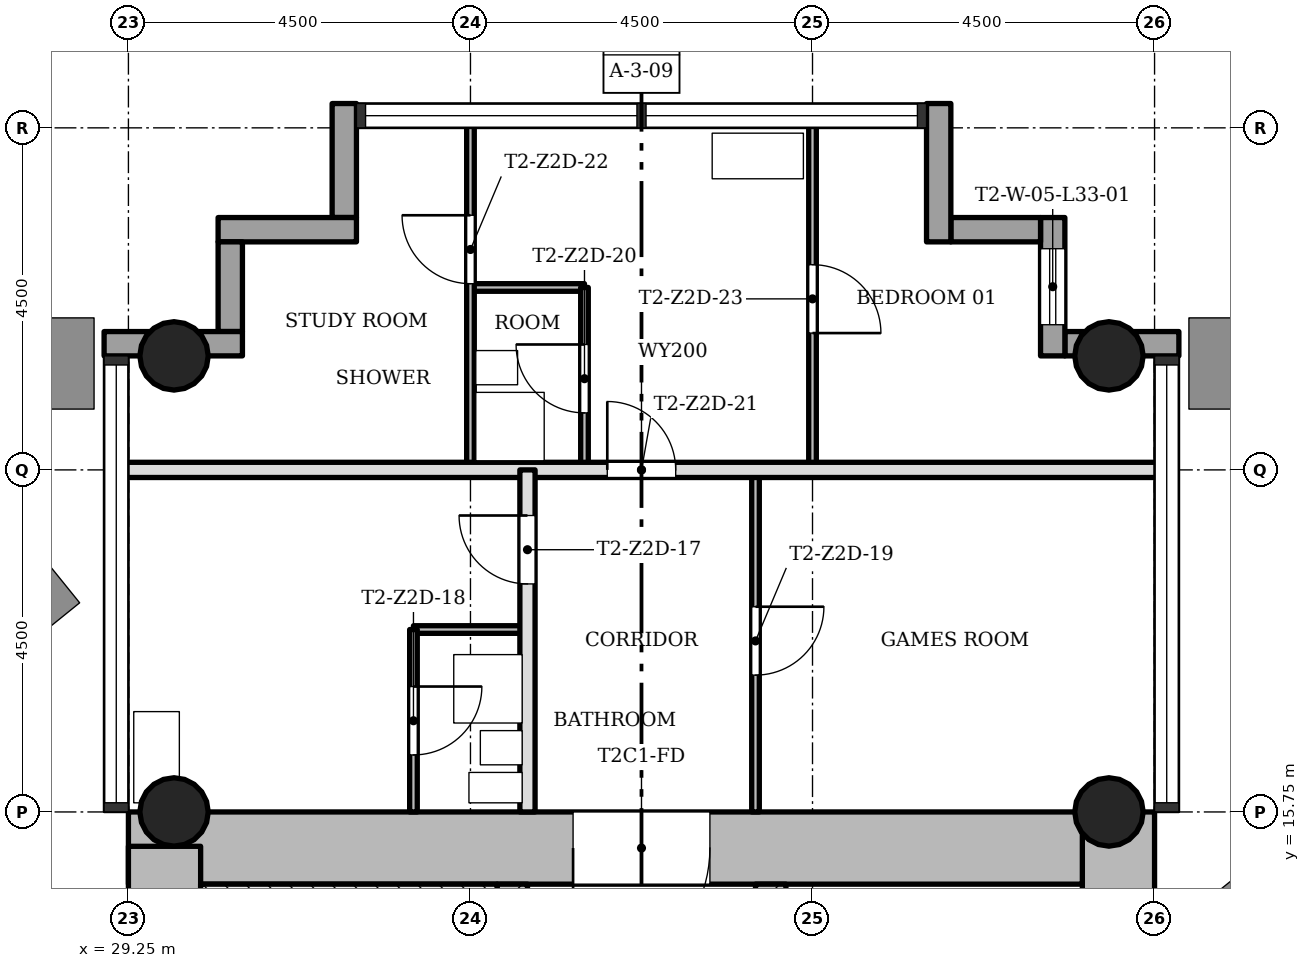
"""IFC4 building model, lengths in metres.
Left out: names, types, materials, properties, quantities, classifications, styles, units other than length and angle.
Written with IfcOpenShell. Run it as: python <this file> out.ifc"""

import sys

from ifc_helpers import new_model, si_unit, direction, frame, frame_2d, origin, origin_2d, place, context, subcontext, project, spatial, rectangle, hollow_circle, extrude, element, fill, save


model = new_model("IFC4")
c1 = context("Model", 3, precision=1e-05, world=origin(), true_north=direction((0.0, 1.0)))
c2 = subcontext(c1, "Body", "Model", "MODEL_VIEW")
j1 = project(units=[si_unit("LENGTHUNIT", "METRE"), si_unit("PLANEANGLEUNIT", "RADIAN")], contexts=[c1])
p1 = place(None, origin())
s1 = spatial("IfcSite", under=j1, at=p1, CompositionType="ELEMENT")
p2 = place(p1, origin())
s2 = spatial("IfcBuilding", under=s1, at=p2, CompositionType="ELEMENT")
p3 = place(p2, frame((0.0, 0.0, 120.8)))
s3 = spatial("IfcBuildingStorey", under=s2, at=p3, CompositionType="ELEMENT", Elevation=120.8)
p4 = place(p3, frame((42.275, 7.7, 0.0), z_axis=(0.0, 0.0, 1.0), x_axis=(0.0, 1.0, 0.0)))
e1 = element("IfcWall", 1, at=p4, inside=s3, PredefinedType="SHEAR", context=c2, shape_type="SweptSolid", body=[
    extrude(rectangle(XDim=8.05, YDim=0.95, at=frame_2d((4.025, 0.0))), origin(), (0.0, 0.0, 1.0), 3.4),
])
p5 = place(p3, frame((41.8, 15.275, 0.0), z_axis=(0.0, 0.0, 1.0), x_axis=(-1.0, 0.0, 0.0)))
e2 = element("IfcWall", 2, at=p5, inside=s3, PredefinedType="SHEAR", context=c2, shape_type="SweptSolid", body=[
    extrude(rectangle(XDim=12.55, YDim=0.95, at=frame_2d((6.275, 0.0))), origin(), (0.0, 0.0, 1.0), 3.4),
])
p6 = place(p5, frame((4.9, 0.0, 0.0)))
e3 = element("IfcOpeningElement", 3, at=p6, cuts=e2, PredefinedType="OPENING", context=c2, shape_type="SweptSolid", body=[
    extrude(rectangle(XDim=1.8, YDim=2.1, at=frame_2d((0.9, 1.05))), frame((0.0, 0.485, 0.0), z_axis=(0.0, -1.0, 0.0), x_axis=(1.0, 0.0, 0.0)), (0.0, 0.0, 1.0), 0.97),
])
p7 = place(p3, frame((29.725, 15.298, 0.0), z_axis=(0.0, 0.0, 1.0), x_axis=(0.0, -1.0, 0.0)))
e4 = element("IfcWall", 4, at=p7, inside=s3, PredefinedType="SHEAR", context=c2, shape_type="SweptSolid", body=[
    extrude(rectangle(XDim=8.696, YDim=0.95, at=frame_2d((4.348, 0.0))), origin(), (0.0, 0.0, 1.0), 3.4),
])
p8 = place(p3, frame((34.3, 7.7, 0.0), z_axis=(0.0, 0.0, 1.0), x_axis=(0.0, 1.0, 0.0)))
e5 = element("IfcWall", 5, at=p8, inside=s3, PredefinedType="SHEAR", context=c2, shape_type="SweptSolid", body=[
    extrude(rectangle(XDim=7.1, YDim=0.4, at=frame_2d((3.55, 0.0))), origin(), (0.0, 0.0, 1.0), 3.4),
])
p9 = place(p8, frame((0.7, 0.0, 0.0)))
e6 = element("IfcOpeningElement", 6, at=p9, cuts=e5, PredefinedType="OPENING", context=c2, shape_type="SweptSolid", body=[
    extrude(rectangle(XDim=0.9, YDim=2.1, at=frame_2d((0.45, 1.05))), frame((0.0, 0.21, 0.0), z_axis=(0.0, -1.0, 0.0), x_axis=(1.0, 0.0, 0.0)), (0.0, 0.0, 1.0), 0.42),
])
p10 = place(p3, frame((37.7, 7.7, 0.0), z_axis=(0.0, 0.0, 1.0), x_axis=(0.0, 1.0, 0.0)))
e7 = element("IfcWall", 7, at=p10, inside=s3, PredefinedType="SHEAR", context=c2, shape_type="SweptSolid", body=[
    extrude(rectangle(XDim=7.1, YDim=0.4, at=frame_2d((3.55, 0.0))), origin(), (0.0, 0.0, 1.0), 3.4),
])
p11 = place(p10, frame((0.8, 0.0, 0.0)))
e8 = element("IfcOpeningElement", 8, at=p11, cuts=e7, PredefinedType="OPENING", context=c2, shape_type="SweptSolid", body=[
    extrude(rectangle(XDim=1.1, YDim=2.1, at=frame_2d((0.55, 1.05))), frame((0.0, 0.21, 0.0), z_axis=(0.0, -1.0, 0.0), x_axis=(1.0, 0.0, 0.0)), (0.0, 0.0, 1.0), 0.42),
])
p12 = place(p10, frame((3.0, 0.0, 0.0)))
e9 = element("IfcOpeningElement", 9, at=p12, cuts=e7, PredefinedType="OPENING", context=c2, shape_type="SweptSolid", body=[
    extrude(rectangle(XDim=1.1, YDim=2.1, at=frame_2d((0.55, 1.05))), frame((0.0, 0.21, 0.0), z_axis=(0.0, -1.0, 0.0), x_axis=(1.0, 0.0, 0.0)), (0.0, 0.0, 1.0), 0.42),
])
p13 = place(p10, frame((5.2, 0.0, 0.0)))
e10 = element("IfcOpeningElement", 10, at=p13, cuts=e7, PredefinedType="OPENING", context=c2, shape_type="SweptSolid", body=[
    extrude(rectangle(XDim=1.1, YDim=2.1, at=frame_2d((0.55, 1.05))), frame((0.0, 0.21, 0.0), z_axis=(0.0, -1.0, 0.0), x_axis=(1.0, 0.0, 0.0)), (0.0, 0.0, 1.0), 0.42),
])
for number, where, z_axis, x_axis in (
    (11, (42.15, 15.75, 0.0), (0.0, 0.0, 1.0), (1.0, 0.0, 0.0)),
    (12, (29.85, 15.75, 0.0), (0.0, 0.0, 1.0), (1.0, 0.0, 0.0)),
    (13, (42.15, 21.75, 0.0), (0.0, 0.0, 1.0), (1.0, 0.0, 0.0)),
    (14, (29.85, 21.75, 0.0), (0.0, 0.0, 1.0), (1.0, 0.0, 0.0)),
):
    element("IfcColumn", number, at=place(p3, frame(where, z_axis=z_axis, x_axis=x_axis)), inside=s3, PredefinedType="COLUMN", context=c2, shape_type="SweptSolid", body=[
        extrude(hollow_circle(Radius=0.45, WallThickness=0.032, at=origin_2d()), origin(), (0.0, 0.0, 1.0), 3.4),
    ])
p14 = place(p3, frame((43.07, 21.91, -0.3), z_axis=(0.0, 0.0, 1.0), x_axis=(-1.0, 0.0, 0.0)))
e15 = element("IfcWall", 15, at=p14, inside=s3, PredefinedType="STANDARD", context=c2, shape_type="SweptSolid", body=[
    extrude(rectangle(XDim=1.5, YDim=0.32, at=frame_2d((0.75, 0.0))), origin(), (0.0, 0.0, 1.0), 3.4),
])
p15 = place(p3, frame((41.41, 21.75, -0.3), z_axis=(0.0, 0.0, 1.0), x_axis=(0.0, 1.0, 0.0)))
e16 = element("IfcWall", 16, at=p15, inside=s3, PredefinedType="STANDARD", context=c2, shape_type="SweptSolid", body=[
    extrude(rectangle(XDim=1.82, YDim=0.32, at=frame_2d((0.91, 0.0))), origin(), (0.0, 0.0, 1.0), 3.4),
])
p16 = place(p15, frame((0.41, 0.0, 1.2)))
e17 = element("IfcOpeningElement", 17, at=p16, cuts=e16, PredefinedType="OPENING", context=c2, shape_type="SweptSolid", body=[
    extrude(rectangle(XDim=1.0, YDim=1.5, at=frame_2d((0.5, 0.75))), frame((0.0, 0.17, 0.0), z_axis=(0.0, -1.0, 0.0), x_axis=(1.0, 0.0, 0.0)), (0.0, 0.0, 1.0), 0.34),
])
p17 = place(p3, frame((41.25, 23.41, -0.3), z_axis=(0.0, 0.0, 1.0), x_axis=(-1.0, 0.0, 0.0)))
e18 = element("IfcWall", 18, at=p17, inside=s3, PredefinedType="STANDARD", context=c2, shape_type="SweptSolid", body=[
    extrude(rectangle(XDim=1.18, YDim=0.32, at=frame_2d((0.59, 0.0))), origin(), (0.0, 0.0, 1.0), 3.4),
])
p18 = place(p3, frame((39.91, 23.25, -0.3), z_axis=(0.0, 0.0, 1.0), x_axis=(0.0, 1.0, 0.0)))
e19 = element("IfcWall", 19, at=p18, inside=s3, PredefinedType="STANDARD", context=c2, shape_type="SweptSolid", body=[
    extrude(rectangle(XDim=1.82, YDim=0.32, at=frame_2d((0.91, 0.0))), origin(), (0.0, 0.0, 1.0), 3.4),
])
p19 = place(p3, frame((32.09, 25.07, -0.3), z_axis=(0.0, 0.0, 1.0), x_axis=(0.0, -1.0, 0.0)))
e20 = element("IfcWall", 20, at=p19, inside=s3, PredefinedType="STANDARD", context=c2, shape_type="SweptSolid", body=[
    extrude(rectangle(XDim=1.5, YDim=0.32, at=frame_2d((0.75, 0.0))), origin(), (0.0, 0.0, 1.0), 3.4),
])
p20 = place(p3, frame((32.25, 23.41, -0.3), z_axis=(0.0, 0.0, 1.0), x_axis=(-1.0, 0.0, 0.0)))
e21 = element("IfcWall", 21, at=p20, inside=s3, PredefinedType="STANDARD", context=c2, shape_type="SweptSolid", body=[
    extrude(rectangle(XDim=1.82, YDim=0.32, at=frame_2d((0.91, 0.0))), origin(), (0.0, 0.0, 1.0), 3.4),
])
p21 = place(p3, frame((30.59, 23.25, -0.3), z_axis=(0.0, 0.0, 1.0), x_axis=(0.0, -1.0, 0.0)))
e22 = element("IfcWall", 22, at=p21, inside=s3, PredefinedType="STANDARD", context=c2, shape_type="SweptSolid", body=[
    extrude(rectangle(XDim=1.18, YDim=0.32, at=frame_2d((0.59, 0.0))), origin(), (0.0, 0.0, 1.0), 3.4),
])
p22 = place(p3, frame((30.75, 21.91, -0.3), z_axis=(0.0, 0.0, 1.0), x_axis=(-1.0, 0.0, 0.0)))
e23 = element("IfcWall", 23, at=p22, inside=s3, PredefinedType="STANDARD", context=c2, shape_type="SweptSolid", body=[
    extrude(rectangle(XDim=1.82, YDim=0.32, at=frame_2d((0.91, 0.0))), origin(), (0.0, 0.0, 1.0), 3.4),
])
p23 = place(p3, frame((34.5, 18.15, 0.0), z_axis=(0.0, 0.0, 1.0), x_axis=(-1.0, 0.0, 0.0)))
e24 = element("IfcWall", 24, at=p23, inside=s3, PredefinedType="PARTITIONING", context=c2, shape_type="SweptSolid", body=[
    extrude(rectangle(XDim=1.5, YDim=0.1, at=frame_2d((0.75, 0.0))), origin(), (0.0, 0.0, 1.0), 3.0),
])
p24 = place(p3, frame((42.85, 20.25, 0.0), z_axis=(0.0, 0.0, 1.0), x_axis=(-1.0, 0.0, 0.0)))
e25 = element("IfcWall", 25, at=p24, inside=s3, PredefinedType="SOLIDWALL", context=c2, shape_type="SweptSolid", body=[
    extrude(rectangle(XDim=13.7, YDim=0.2, at=frame_2d((6.85, 0.0))), origin(), (0.0, 0.0, 1.0), 3.0),
])
p25 = place(p24, frame((6.4, 0.0, 0.0)))
e26 = element("IfcOpeningElement", 26, at=p25, cuts=e25, PredefinedType="OPENING", context=c2, shape_type="SweptSolid", body=[
    extrude(rectangle(XDim=0.9, YDim=2.1, at=frame_2d((0.45, 1.05))), frame((0.0, 0.11, 0.0), z_axis=(0.0, -1.0, 0.0), x_axis=(1.0, 0.0, 0.0)), (0.0, 0.0, 1.0), 0.22),
])
p26 = place(p3, frame((35.25, 22.65, 0.0), z_axis=(0.0, 0.0, 1.0), x_axis=(-1.0, 0.0, 0.0)))
e27 = element("IfcWall", 27, at=p26, inside=s3, PredefinedType="PARTITIONING", context=c2, shape_type="SweptSolid", body=[
    extrude(rectangle(XDim=1.5, YDim=0.1, at=frame_2d((0.75, 0.0))), origin(), (0.0, 0.0, 1.0), 3.0),
])
p27 = place(p3, frame((38.25, 20.25, 0.0), z_axis=(0.0, 0.0, 1.0), x_axis=(0.0, 1.0, 0.0)))
e28 = element("IfcWall", 28, at=p27, inside=s3, PredefinedType="PARTITIONING", context=c2, shape_type="SweptSolid", body=[
    extrude(rectangle(XDim=4.6, YDim=0.1, at=frame_2d((2.3, 0.0))), origin(), (0.0, 0.0, 1.0), 3.0),
])
p28 = place(p27, frame((1.8, 0.0, 0.0)))
e29 = element("IfcOpeningElement", 29, at=p28, cuts=e28, PredefinedType="OPENING", context=c2, shape_type="SweptSolid", body=[
    extrude(rectangle(XDim=0.9, YDim=2.1, at=frame_2d((0.45, 1.05))), frame((0.0, 0.06, 0.0), z_axis=(0.0, -1.0, 0.0), x_axis=(1.0, 0.0, 0.0)), (0.0, 0.0, 1.0), 0.12),
])
p29 = place(p3, frame((37.5, 15.75, 0.0), z_axis=(0.0, 0.0, 1.0), x_axis=(0.0, 1.0, 0.0)))
e30 = element("IfcWall", 30, at=p29, inside=s3, PredefinedType="PARTITIONING", context=c2, shape_type="SweptSolid", body=[
    extrude(rectangle(XDim=4.5, YDim=0.1, at=frame_2d((2.25, 0.0))), origin(), (0.0, 0.0, 1.0), 3.0),
])
p30 = place(p29, frame((1.8, 0.0, 0.0)))
e31 = element("IfcOpeningElement", 31, at=p30, cuts=e30, PredefinedType="OPENING", context=c2, shape_type="SweptSolid", body=[
    extrude(rectangle(XDim=0.9, YDim=2.1, at=frame_2d((0.45, 1.05))), frame((0.0, 0.06, 0.0), z_axis=(0.0, -1.0, 0.0), x_axis=(1.0, 0.0, 0.0)), (0.0, 0.0, 1.0), 0.12),
])
p31 = place(p3, frame((35.25, 20.25, 0.0), z_axis=(0.0, 0.0, 1.0), x_axis=(0.0, 1.0, 0.0)))
e32 = element("IfcWall", 32, at=p31, inside=s3, PredefinedType="PARTITIONING", context=c2, shape_type="SweptSolid", body=[
    extrude(rectangle(XDim=2.4, YDim=0.1, at=frame_2d((1.2, 0.0))), origin(), (0.0, 0.0, 1.0), 3.0),
])
p32 = place(p31, frame((0.75, 0.0, 0.0)))
e33 = element("IfcOpeningElement", 33, at=p32, cuts=e32, PredefinedType="OPENING", context=c2, shape_type="SweptSolid", body=[
    extrude(rectangle(XDim=0.9, YDim=2.1, at=frame_2d((0.45, 1.05))), frame((0.0, 0.06, 0.0), z_axis=(0.0, -1.0, 0.0), x_axis=(1.0, 0.0, 0.0)), (0.0, 0.0, 1.0), 0.12),
])
p33 = place(p3, frame((34.5, 15.75, 0.0), z_axis=(0.0, 0.0, 1.0), x_axis=(0.0, 1.0, 0.0)))
e34 = element("IfcWall", 34, at=p33, inside=s3, PredefinedType="SOLIDWALL", context=c2, shape_type="SweptSolid", body=[
    extrude(rectangle(XDim=4.5, YDim=0.2, at=frame_2d((2.25, 0.0))), origin(), (0.0, 0.0, 1.0), 3.0),
])
p34 = place(p33, frame((3.0, 0.0, 0.0)))
e35 = element("IfcOpeningElement", 35, at=p34, cuts=e34, PredefinedType="OPENING", context=c2, shape_type="SweptSolid", body=[
    extrude(rectangle(XDim=0.9, YDim=2.1, at=frame_2d((0.45, 1.05))), frame((0.0, 0.11, 0.0), z_axis=(0.0, -1.0, 0.0), x_axis=(1.0, 0.0, 0.0)), (0.0, 0.0, 1.0), 0.22),
])
p35 = place(p3, frame((33.75, 20.25, 0.0), z_axis=(0.0, 0.0, 1.0), x_axis=(0.0, 1.0, 0.0)))
e36 = element("IfcWall", 36, at=p35, inside=s3, PredefinedType="PARTITIONING", context=c2, shape_type="SweptSolid", body=[
    extrude(rectangle(XDim=4.6, YDim=0.1, at=frame_2d((2.3, 0.0))), origin(), (0.0, 0.0, 1.0), 3.0),
])
p36 = place(p35, frame((2.45, 0.0, 0.0)))
e37 = element("IfcOpeningElement", 37, at=p36, cuts=e36, PredefinedType="OPENING", context=c2, shape_type="SweptSolid", body=[
    extrude(rectangle(XDim=0.9, YDim=2.1, at=frame_2d((0.45, 1.05))), frame((0.0, 0.06, 0.0), z_axis=(0.0, -1.0, 0.0), x_axis=(1.0, 0.0, 0.0)), (0.0, 0.0, 1.0), 0.12),
])
p37 = place(p3, frame((33.0, 15.75, 0.0), z_axis=(0.0, 0.0, 1.0), x_axis=(0.0, 1.0, 0.0)))
e38 = element("IfcWall", 38, at=p37, inside=s3, PredefinedType="PARTITIONING", context=c2, shape_type="SweptSolid", body=[
    extrude(rectangle(XDim=2.4, YDim=0.1, at=frame_2d((1.2, 0.0))), origin(), (0.0, 0.0, 1.0), 3.0),
])
p38 = place(p37, frame((0.75, 0.0, 0.0)))
e39 = element("IfcOpeningElement", 39, at=p38, cuts=e38, PredefinedType="OPENING", context=c2, shape_type="SweptSolid", body=[
    extrude(rectangle(XDim=0.9, YDim=2.1, at=frame_2d((0.45, 1.05))), frame((0.0, 0.06, 0.0), z_axis=(0.0, -1.0, 0.0), x_axis=(1.0, 0.0, 0.0)), (0.0, 0.0, 1.0), 0.12),
])
p39 = place(p3, frame((34.1, 14.675, 0.0), z_axis=(0.0, 0.0, 1.0), x_axis=(-1.0, 0.0, 0.0)))
e40 = element("IfcWall", 40, at=p39, inside=s3, PredefinedType="SHEAR", context=c2, shape_type="SweptSolid", body=[
    extrude(rectangle(XDim=3.9, YDim=0.25, at=frame_2d((1.95, 0.0))), origin(), (0.0, 0.0, 1.0), 3.4),
])
p40 = place(p34, origin())
e41 = element("IfcDoor", 41, at=p40, inside=s3, OperationType="SINGLE_SWING_LEFT", PredefinedType="DOOR", context=c2, shape_type="SweptSolid", body=[
    extrude(rectangle(XDim=0.9, YDim=2.1, at=frame_2d((0.45, 1.05))), frame((0.0, 0.025, 0.0), z_axis=(0.0, -1.0, 0.0), x_axis=(1.0, 0.0, 0.0)), (0.0, 0.0, 1.0), 0.05),
])
fill(e35, e41)
p41 = place(p38, origin())
e42 = element("IfcDoor", 42, at=p41, inside=s3, OperationType="SINGLE_SWING_RIGHT", PredefinedType="DOOR", context=c2, shape_type="SweptSolid", body=[
    extrude(rectangle(XDim=0.9, YDim=2.1, at=frame_2d((0.45, 1.05))), frame((0.0, 0.025, 0.0), z_axis=(0.0, -1.0, 0.0), x_axis=(1.0, 0.0, 0.0)), (0.0, 0.0, 1.0), 0.05),
])
fill(e39, e42)
p42 = place(p30, origin())
e43 = element("IfcDoor", 43, at=p42, inside=s3, OperationType="SINGLE_SWING_RIGHT", PredefinedType="DOOR", context=c2, shape_type="SweptSolid", body=[
    extrude(rectangle(XDim=0.9, YDim=2.1, at=frame_2d((0.45, 1.05))), frame((0.0, 0.025, 0.0), z_axis=(0.0, -1.0, 0.0), x_axis=(1.0, 0.0, 0.0)), (0.0, 0.0, 1.0), 0.05),
])
fill(e31, e43)
p43 = place(p32, origin())
e44 = element("IfcDoor", 44, at=p43, inside=s3, OperationType="SINGLE_SWING_LEFT", PredefinedType="DOOR", context=c2, shape_type="SweptSolid", body=[
    extrude(rectangle(XDim=0.9, YDim=2.1, at=frame_2d((0.45, 1.05))), frame((0.0, 0.025, 0.0), z_axis=(0.0, -1.0, 0.0), x_axis=(1.0, 0.0, 0.0)), (0.0, 0.0, 1.0), 0.05),
])
fill(e33, e44)
p44 = place(p25, origin())
e45 = element("IfcDoor", 45, at=p44, inside=s3, OperationType="SINGLE_SWING_RIGHT", PredefinedType="DOOR", context=c2, shape_type="SweptSolid", body=[
    extrude(rectangle(XDim=0.9, YDim=2.1, at=frame_2d((0.45, 1.05))), frame((0.0, 0.025, 0.0), z_axis=(0.0, -1.0, 0.0), x_axis=(1.0, 0.0, 0.0)), (0.0, 0.0, 1.0), 0.05),
])
fill(e26, e45)
p45 = place(p36, origin())
e46 = element("IfcDoor", 46, at=p45, inside=s3, OperationType="SINGLE_SWING_LEFT", PredefinedType="DOOR", context=c2, shape_type="SweptSolid", body=[
    extrude(rectangle(XDim=0.9, YDim=2.1, at=frame_2d((0.45, 1.05))), frame((0.0, 0.025, 0.0), z_axis=(0.0, -1.0, 0.0), x_axis=(1.0, 0.0, 0.0)), (0.0, 0.0, 1.0), 0.05),
])
fill(e37, e46)
p46 = place(p28, origin())
e47 = element("IfcDoor", 47, at=p46, inside=s3, OperationType="SINGLE_SWING_LEFT", PredefinedType="DOOR", context=c2, shape_type="SweptSolid", body=[
    extrude(rectangle(XDim=0.9, YDim=2.1, at=frame_2d((0.45, 1.05))), frame((0.0, 0.025, 0.0), z_axis=(0.0, -1.0, 0.0), x_axis=(1.0, 0.0, 0.0)), (0.0, 0.0, 1.0), 0.05),
])
fill(e29, e47)
p47 = place(p6, origin())
e48 = element("IfcDoor", 48, at=p47, inside=s3, OperationType="SINGLE_SWING_LEFT", PredefinedType="DOOR", context=c2, shape_type="SweptSolid", body=[
    extrude(rectangle(XDim=1.8, YDim=2.1, at=frame_2d((0.9, 1.05))), frame((0.0, 0.025, 0.0), z_axis=(0.0, -1.0, 0.0), x_axis=(1.0, 0.0, 0.0)), (0.0, 0.0, 1.0), 0.05),
])
fill(e3, e48)
p48 = place(p16, origin())
e49 = element("IfcWindow", 49, at=p48, inside=s3, PartitioningType="SINGLE_PANEL", PredefinedType="WINDOW", context=c2, shape_type="SweptSolid", body=[
    extrude(rectangle(XDim=1.0, YDim=1.5, at=frame_2d((0.5, 0.75))), frame((0.0, 0.03, 0.0), z_axis=(0.0, -1.0, 0.0), x_axis=(1.0, 0.0, 0.0)), (0.0, 0.0, 1.0), 0.06),
])
fill(e17, e49)
save(model, sys.argv[1])
